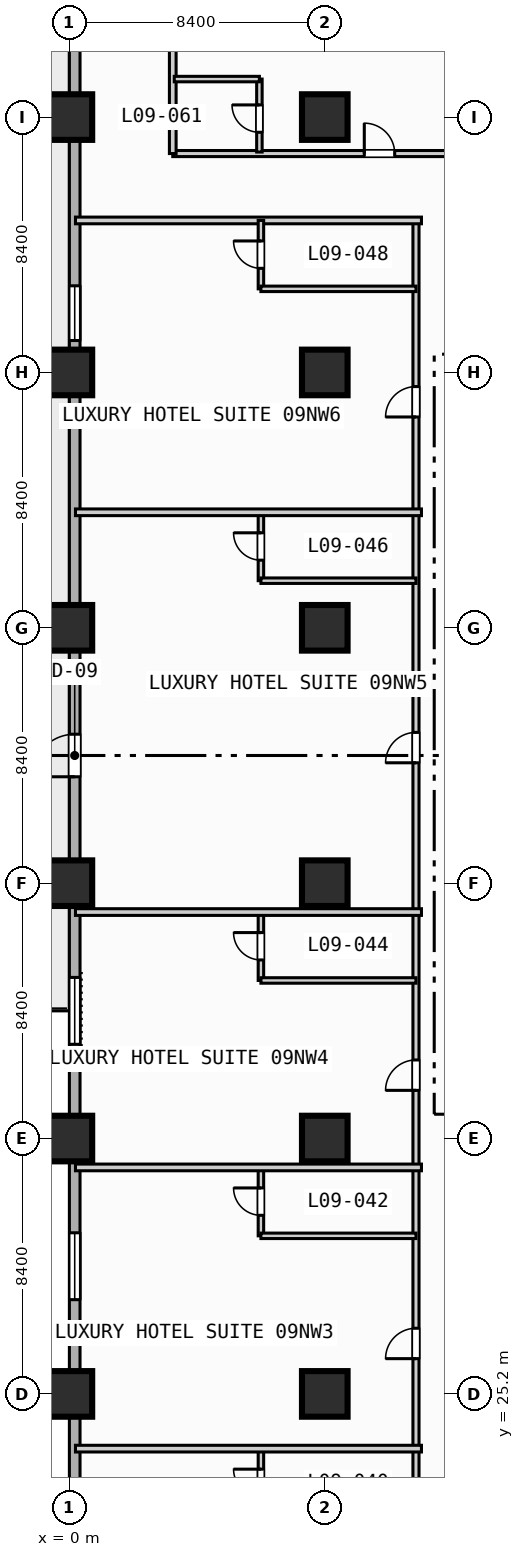
"""IFC4 building model, lengths in metres.
Left out: names, types, materials, properties, quantities, classifications, styles, units other than length and angle.
Written with IfcOpenShell. Run it as: python <this file> out.ifc"""

import sys

from ifc_helpers import new_model, si_unit, direction, frame, frame_2d, origin, origin_2d, place, context, subcontext, project, spatial, rectangle, extrude, element, fill, save


model = new_model("IFC4")
c1 = context("Model", 3, precision=1e-05, world=origin(), true_north=direction((0.0, 1.0)))
c2 = subcontext(c1, "Body", "Model", "MODEL_VIEW")
j1 = project(units=[si_unit("LENGTHUNIT", "METRE"), si_unit("PLANEANGLEUNIT", "RADIAN")], contexts=[c1])
p1 = place(None, origin())
s1 = spatial("IfcSite", under=j1, at=p1, CompositionType="ELEMENT")
p2 = place(p1, origin())
s2 = spatial("IfcBuilding", under=s1, at=p2, CompositionType="ELEMENT")
p3 = place(p2, frame((0.0, 0.0, 43.4)))
s3 = spatial("IfcBuildingStorey", under=s2, at=p3, CompositionType="ELEMENT", Elevation=43.4)
for number, where, z_axis, x_axis in (
    (1, (0.0, 25.2, 0.0), (0.0, 0.0, 1.0), (1.0, 0.0, 0.0)),
    (2, (0.0, 33.6, 0.0), (0.0, 0.0, 1.0), (1.0, 0.0, 0.0)),
    (3, (0.0, 42.0, 0.0), (0.0, 0.0, 1.0), (1.0, 0.0, 0.0)),
    (4, (0.0, 50.4, 0.0), (0.0, 0.0, 1.0), (1.0, 0.0, 0.0)),
    (5, (0.0, 58.8, 0.0), (0.0, 0.0, 1.0), (1.0, 0.0, 0.0)),
    (6, (0.0, 67.2, 0.0), (0.0, 0.0, 1.0), (1.0, 0.0, 0.0)),
    (7, (8.4, 25.2, 0.0), (0.0, 0.0, 1.0), (1.0, 0.0, 0.0)),
    (8, (8.4, 33.6, 0.0), (0.0, 0.0, 1.0), (1.0, 0.0, 0.0)),
    (9, (8.4, 42.0, 0.0), (0.0, 0.0, 1.0), (1.0, 0.0, 0.0)),
    (10, (8.4, 50.4, 0.0), (0.0, 0.0, 1.0), (1.0, 0.0, 0.0)),
    (11, (8.4, 58.8, 0.0), (0.0, 0.0, 1.0), (1.0, 0.0, 0.0)),
    (12, (8.4, 67.2, 0.0), (0.0, 0.0, 1.0), (1.0, 0.0, 0.0)),
):
    element("IfcColumn", number, at=place(p3, frame(where, z_axis=z_axis, x_axis=x_axis)), inside=s3, PredefinedType="COLUMN", context=c2, shape_type="SweptSolid", body=[
        extrude(rectangle(XDim=1.5, YDim=1.5, at=origin_2d()), origin(), (0.0, 0.0, 1.0), 3.8),
    ])
p4 = place(p3, frame((0.175, 3.175, 0.0), z_axis=(0.0, 0.0, 1.0), x_axis=(0.0, 1.0, 0.0)))
e13 = element("IfcWall", 13, at=p4, inside=s3, PredefinedType="STANDARD", context=c2, shape_type="SweptSolid", body=[
    extrude(rectangle(XDim=86.05, YDim=0.35, at=frame_2d((43.025, 0.0))), origin(), (0.0, 0.0, 1.0), 3.55),
])
p5 = place(p4, frame((42.325, 0.0, 0.0)))
e14 = element("IfcOpeningElement", 14, at=p5, cuts=e13, PredefinedType="OPENING", context=c2, shape_type="SweptSolid", body=[
    extrude(rectangle(XDim=1.4, YDim=2.2, at=frame_2d((0.7, 1.1))), frame((0.0, 0.185, 0.0), z_axis=(0.0, -1.0, 0.0), x_axis=(1.0, 0.0, 0.0)), (0.0, 0.0, 1.0), 0.37),
])
p6 = place(p4, frame((8.325, 0.0, 0.85)))
e15 = element("IfcOpeningElement", 15, at=p6, cuts=e13, PredefinedType="OPENING", context=c2, shape_type="SweptSolid", body=[
    extrude(rectangle(XDim=2.2, YDim=1.8, at=frame_2d((1.1, 0.9))), frame((0.0, 0.185, 0.0), z_axis=(0.0, -1.0, 0.0), x_axis=(1.0, 0.0, 0.0)), (0.0, 0.0, 1.0), 0.37),
])
p7 = place(p4, frame((16.725, 0.0, 0.85)))
e16 = element("IfcOpeningElement", 16, at=p7, cuts=e13, PredefinedType="OPENING", context=c2, shape_type="SweptSolid", body=[
    extrude(rectangle(XDim=2.2, YDim=1.8, at=frame_2d((1.1, 0.9))), frame((0.0, 0.185, 0.0), z_axis=(0.0, -1.0, 0.0), x_axis=(1.0, 0.0, 0.0)), (0.0, 0.0, 1.0), 0.37),
])
p8 = place(p4, frame((25.125, 0.0, 0.85)))
e17 = element("IfcOpeningElement", 17, at=p8, cuts=e13, PredefinedType="OPENING", context=c2, shape_type="SweptSolid", body=[
    extrude(rectangle(XDim=2.2, YDim=1.8, at=frame_2d((1.1, 0.9))), frame((0.0, 0.185, 0.0), z_axis=(0.0, -1.0, 0.0), x_axis=(1.0, 0.0, 0.0)), (0.0, 0.0, 1.0), 0.37),
])
p9 = place(p4, frame((33.525, 0.0, 0.85)))
e18 = element("IfcOpeningElement", 18, at=p9, cuts=e13, PredefinedType="OPENING", context=c2, shape_type="SweptSolid", body=[
    extrude(rectangle(XDim=2.2, YDim=1.8, at=frame_2d((1.1, 0.9))), frame((0.0, 0.185, 0.0), z_axis=(0.0, -1.0, 0.0), x_axis=(1.0, 0.0, 0.0)), (0.0, 0.0, 1.0), 0.37),
])
p10 = place(p4, frame((56.675, 0.0, 0.85)))
e19 = element("IfcOpeningElement", 19, at=p10, cuts=e13, PredefinedType="OPENING", context=c2, shape_type="SweptSolid", body=[
    extrude(rectangle(XDim=1.8, YDim=1.8, at=frame_2d((0.9, 0.9))), frame((0.0, 0.185, 0.0), z_axis=(0.0, -1.0, 0.0), x_axis=(1.0, 0.0, 0.0)), (0.0, 0.0, 1.0), 0.37),
])
p11 = place(p3, frame((11.4, 3.4, 0.0), z_axis=(0.0, 0.0, 1.0), x_axis=(0.0, 1.0, 0.0)))
e20 = element("IfcWall", 20, at=p11, inside=s3, PredefinedType="PARTITIONING", context=c2, shape_type="SweptSolid", body=[
    extrude(rectangle(XDim=60.4, YDim=0.2, at=frame_2d((30.2, 0.0))), origin(), (0.0, 0.0, 1.0), 3.55),
])
p12 = place(p11, frame((6.065, 0.0, 0.0)))
e21 = element("IfcOpeningElement", 21, at=p12, cuts=e20, PredefinedType="OPENING", context=c2, shape_type="SweptSolid", body=[
    extrude(rectangle(XDim=1.0, YDim=2.15, at=frame_2d((0.5, 1.075))), frame((0.0, 0.11, 0.0), z_axis=(0.0, -1.0, 0.0), x_axis=(1.0, 0.0, 0.0)), (0.0, 0.0, 1.0), 0.22),
])
p13 = place(p11, frame((13.735, 0.0, 0.0)))
e22 = element("IfcOpeningElement", 22, at=p13, cuts=e20, PredefinedType="OPENING", context=c2, shape_type="SweptSolid", body=[
    extrude(rectangle(XDim=1.0, YDim=2.15, at=frame_2d((0.5, 1.075))), frame((0.0, 0.11, 0.0), z_axis=(0.0, -1.0, 0.0), x_axis=(1.0, 0.0, 0.0)), (0.0, 0.0, 1.0), 0.22),
])
p14 = place(p11, frame((22.96, 0.0, 0.0)))
e23 = element("IfcOpeningElement", 23, at=p14, cuts=e20, PredefinedType="OPENING", context=c2, shape_type="SweptSolid", body=[
    extrude(rectangle(XDim=1.0, YDim=2.15, at=frame_2d((0.5, 1.075))), frame((0.0, 0.11, 0.0), z_axis=(0.0, -1.0, 0.0), x_axis=(1.0, 0.0, 0.0)), (0.0, 0.0, 1.0), 0.22),
])
p15 = place(p11, frame((31.785, 0.0, 0.0)))
e24 = element("IfcOpeningElement", 24, at=p15, cuts=e20, PredefinedType="OPENING", context=c2, shape_type="SweptSolid", body=[
    extrude(rectangle(XDim=1.0, YDim=2.15, at=frame_2d((0.5, 1.075))), frame((0.0, 0.11, 0.0), z_axis=(0.0, -1.0, 0.0), x_axis=(1.0, 0.0, 0.0)), (0.0, 0.0, 1.0), 0.22),
])
p16 = place(p11, frame((42.56, 0.0, 0.0)))
e25 = element("IfcOpeningElement", 25, at=p16, cuts=e20, PredefinedType="OPENING", context=c2, shape_type="SweptSolid", body=[
    extrude(rectangle(XDim=1.0, YDim=2.15, at=frame_2d((0.5, 1.075))), frame((0.0, 0.11, 0.0), z_axis=(0.0, -1.0, 0.0), x_axis=(1.0, 0.0, 0.0)), (0.0, 0.0, 1.0), 0.22),
])
p17 = place(p11, frame((53.935, 0.0, 0.0)))
e26 = element("IfcOpeningElement", 26, at=p17, cuts=e20, PredefinedType="OPENING", context=c2, shape_type="SweptSolid", body=[
    extrude(rectangle(XDim=1.0, YDim=2.15, at=frame_2d((0.5, 1.075))), frame((0.0, 0.11, 0.0), z_axis=(0.0, -1.0, 0.0), x_axis=(1.0, 0.0, 0.0)), (0.0, 0.0, 1.0), 0.22),
])
p18 = place(p3, frame((6.3, 21.15, 0.0), z_axis=(0.0, 0.0, 1.0), x_axis=(0.0, 1.0, 0.0)))
e27 = element("IfcWall", 27, at=p18, inside=s3, PredefinedType="PLUMBINGWALL", context=c2, shape_type="SweptSolid", body=[
    extrude(rectangle(XDim=2.25, YDim=0.18, at=frame_2d((1.125, 0.0))), origin(), (0.0, 0.0, 1.0), 3.55),
])
p19 = place(p18, frame((0.675, 0.0, 0.0)))
e28 = element("IfcOpeningElement", 28, at=p19, cuts=e27, PredefinedType="OPENING", context=c2, shape_type="SweptSolid", body=[
    extrude(rectangle(XDim=0.9, YDim=2.1, at=frame_2d((0.45, 1.05))), frame((0.0, 0.1, 0.0), z_axis=(0.0, -1.0, 0.0), x_axis=(1.0, 0.0, 0.0)), (0.0, 0.0, 1.0), 0.2),
])
p20 = place(p3, frame((0.2, 23.4, 0.0), z_axis=(0.0, 0.0, 1.0), x_axis=(1.0, 0.0, 0.0)))
e29 = element("IfcWall", 29, at=p20, inside=s3, PredefinedType="PARTITIONING", context=c2, shape_type="SweptSolid", body=[
    extrude(rectangle(XDim=11.38, YDim=0.22, at=frame_2d((5.69, 0.0))), origin(), (0.0, 0.0, 1.0), 3.55),
])
p21 = place(p3, frame((6.3, 30.4, 0.0), z_axis=(0.0, 0.0, 1.0), x_axis=(0.0, 1.0, 0.0)))
e30 = element("IfcWall", 30, at=p21, inside=s3, PredefinedType="PLUMBINGWALL", context=c2, shape_type="SweptSolid", body=[
    extrude(rectangle(XDim=2.25, YDim=0.18, at=frame_2d((1.125, 0.0))), origin(), (0.0, 0.0, 1.0), 3.55),
])
p22 = place(p21, frame((0.675, 0.0, 0.0)))
e31 = element("IfcOpeningElement", 31, at=p22, cuts=e30, PredefinedType="OPENING", context=c2, shape_type="SweptSolid", body=[
    extrude(rectangle(XDim=0.9, YDim=2.1, at=frame_2d((0.45, 1.05))), frame((0.0, 0.1, 0.0), z_axis=(0.0, -1.0, 0.0), x_axis=(1.0, 0.0, 0.0)), (0.0, 0.0, 1.0), 0.2),
])
p23 = place(p3, frame((6.3, 30.4, 0.0), z_axis=(0.0, 0.0, 1.0), x_axis=(1.0, 0.0, 0.0)))
e32 = element("IfcWall", 32, at=p23, inside=s3, PredefinedType="PLUMBINGWALL", context=c2, shape_type="SweptSolid", body=[
    extrude(rectangle(XDim=5.1, YDim=0.18, at=frame_2d((2.55, 0.0))), origin(), (0.0, 0.0, 1.0), 3.55),
])
p24 = place(p3, frame((0.2, 32.65, 0.0), z_axis=(0.0, 0.0, 1.0), x_axis=(1.0, 0.0, 0.0)))
e33 = element("IfcWall", 33, at=p24, inside=s3, PredefinedType="PARTITIONING", context=c2, shape_type="SweptSolid", body=[
    extrude(rectangle(XDim=11.38, YDim=0.22, at=frame_2d((5.69, 0.0))), origin(), (0.0, 0.0, 1.0), 3.55),
])
p25 = place(p3, frame((6.3, 38.8, 0.0), z_axis=(0.0, 0.0, 1.0), x_axis=(0.0, 1.0, 0.0)))
e34 = element("IfcWall", 34, at=p25, inside=s3, PredefinedType="PLUMBINGWALL", context=c2, shape_type="SweptSolid", body=[
    extrude(rectangle(XDim=2.25, YDim=0.18, at=frame_2d((1.125, 0.0))), origin(), (0.0, 0.0, 1.0), 3.55),
])
p26 = place(p25, frame((0.675, 0.0, 0.0)))
e35 = element("IfcOpeningElement", 35, at=p26, cuts=e34, PredefinedType="OPENING", context=c2, shape_type="SweptSolid", body=[
    extrude(rectangle(XDim=0.9, YDim=2.1, at=frame_2d((0.45, 1.05))), frame((0.0, 0.1, 0.0), z_axis=(0.0, -1.0, 0.0), x_axis=(1.0, 0.0, 0.0)), (0.0, 0.0, 1.0), 0.2),
])
p27 = place(p3, frame((6.3, 38.8, 0.0), z_axis=(0.0, 0.0, 1.0), x_axis=(1.0, 0.0, 0.0)))
e36 = element("IfcWall", 36, at=p27, inside=s3, PredefinedType="PLUMBINGWALL", context=c2, shape_type="SweptSolid", body=[
    extrude(rectangle(XDim=5.1, YDim=0.18, at=frame_2d((2.55, 0.0))), origin(), (0.0, 0.0, 1.0), 3.55),
])
p28 = place(p3, frame((0.2, 41.05, 0.0), z_axis=(0.0, 0.0, 1.0), x_axis=(1.0, 0.0, 0.0)))
e37 = element("IfcWall", 37, at=p28, inside=s3, PredefinedType="PARTITIONING", context=c2, shape_type="SweptSolid", body=[
    extrude(rectangle(XDim=11.38, YDim=0.22, at=frame_2d((5.69, 0.0))), origin(), (0.0, 0.0, 1.0), 3.55),
])
p29 = place(p3, frame((6.3, 51.95, 0.0), z_axis=(0.0, 0.0, 1.0), x_axis=(0.0, 1.0, 0.0)))
e38 = element("IfcWall", 38, at=p29, inside=s3, PredefinedType="PLUMBINGWALL", context=c2, shape_type="SweptSolid", body=[
    extrude(rectangle(XDim=2.25, YDim=0.18, at=frame_2d((1.125, 0.0))), origin(), (0.0, 0.0, 1.0), 3.55),
])
p30 = place(p29, frame((0.675, 0.0, 0.0)))
e39 = element("IfcOpeningElement", 39, at=p30, cuts=e38, PredefinedType="OPENING", context=c2, shape_type="SweptSolid", body=[
    extrude(rectangle(XDim=0.9, YDim=2.1, at=frame_2d((0.45, 1.05))), frame((0.0, 0.1, 0.0), z_axis=(0.0, -1.0, 0.0), x_axis=(1.0, 0.0, 0.0)), (0.0, 0.0, 1.0), 0.2),
])
p31 = place(p3, frame((6.3, 51.95, 0.0), z_axis=(0.0, 0.0, 1.0), x_axis=(1.0, 0.0, 0.0)))
e40 = element("IfcWall", 40, at=p31, inside=s3, PredefinedType="PLUMBINGWALL", context=c2, shape_type="SweptSolid", body=[
    extrude(rectangle(XDim=5.1, YDim=0.18, at=frame_2d((2.55, 0.0))), origin(), (0.0, 0.0, 1.0), 3.55),
])
for number, where, z_axis, x_axis in (
    (41, (0.2, 54.2, 0.0), (0.0, 0.0, 1.0), (1.0, 0.0, 0.0)),
    (42, (0.2, 63.8, 0.0), (0.0, 0.0, 1.0), (1.0, 0.0, 0.0)),
):
    element("IfcWall", number, at=place(p3, frame(where, z_axis=z_axis, x_axis=x_axis)), inside=s3, PredefinedType="PARTITIONING", context=c2, shape_type="SweptSolid", body=[
        extrude(rectangle(XDim=11.38, YDim=0.22, at=frame_2d((5.69, 0.0))), origin(), (0.0, 0.0, 1.0), 3.55),
    ])
p32 = place(p3, frame((6.3, 61.55, 0.0), z_axis=(0.0, 0.0, 1.0), x_axis=(0.0, 1.0, 0.0)))
e43 = element("IfcWall", 43, at=p32, inside=s3, PredefinedType="PLUMBINGWALL", context=c2, shape_type="SweptSolid", body=[
    extrude(rectangle(XDim=2.25, YDim=0.18, at=frame_2d((1.125, 0.0))), origin(), (0.0, 0.0, 1.0), 3.55),
])
p33 = place(p32, frame((0.675, 0.0, 0.0)))
e44 = element("IfcOpeningElement", 44, at=p33, cuts=e43, PredefinedType="OPENING", context=c2, shape_type="SweptSolid", body=[
    extrude(rectangle(XDim=0.9, YDim=2.1, at=frame_2d((0.45, 1.05))), frame((0.0, 0.1, 0.0), z_axis=(0.0, -1.0, 0.0), x_axis=(1.0, 0.0, 0.0)), (0.0, 0.0, 1.0), 0.2),
])
p34 = place(p3, frame((6.3, 61.55, 0.0), z_axis=(0.0, 0.0, 1.0), x_axis=(1.0, 0.0, 0.0)))
e45 = element("IfcWall", 45, at=p34, inside=s3, PredefinedType="PLUMBINGWALL", context=c2, shape_type="SweptSolid", body=[
    extrude(rectangle(XDim=5.1, YDim=0.18, at=frame_2d((2.55, 0.0))), origin(), (0.0, 0.0, 1.0), 3.55),
])
p35 = place(p3, frame((3.4, 66.0, 0.0), z_axis=(0.0, 0.0, 1.0), x_axis=(1.0, 0.0, 0.0)))
e46 = element("IfcWall", 46, at=p35, inside=s3, PredefinedType="PARTITIONING", context=c2, shape_type="SweptSolid", body=[
    extrude(rectangle(XDim=18.2, YDim=0.2, at=frame_2d((9.1, 0.0))), origin(), (0.0, 0.0, 1.0), 3.55),
])
p36 = place(p35, frame((6.3, 0.0, 0.0)))
e47 = element("IfcOpeningElement", 47, at=p36, cuts=e46, PredefinedType="OPENING", context=c2, shape_type="SweptSolid", body=[
    extrude(rectangle(XDim=1.0, YDim=2.15, at=frame_2d((0.5, 1.075))), frame((0.0, 0.11, 0.0), z_axis=(0.0, -1.0, 0.0), x_axis=(1.0, 0.0, 0.0)), (0.0, 0.0, 1.0), 0.22),
])
p37 = place(p3, frame((3.4, 66.0, 0.0), z_axis=(0.0, 0.0, 1.0), x_axis=(0.0, 1.0, 0.0)))
e48 = element("IfcWall", 48, at=p37, inside=s3, PredefinedType="PARTITIONING", context=c2, shape_type="SweptSolid", body=[
    extrude(rectangle(XDim=23.0, YDim=0.22, at=frame_2d((11.5, 0.0))), origin(), (0.0, 0.0, 1.0), 3.55),
])
p38 = place(p3, frame((6.25, 66.05, 0.0), z_axis=(0.0, 0.0, 1.0), x_axis=(0.0, 1.0, 0.0)))
e49 = element("IfcWall", 49, at=p38, inside=s3, PredefinedType="PLUMBINGWALL", context=c2, shape_type="SweptSolid", body=[
    extrude(rectangle(XDim=2.4, YDim=0.18, at=frame_2d((1.2, 0.0))), origin(), (0.0, 0.0, 1.0), 3.55),
])
p39 = place(p38, frame((0.65, 0.0, 0.0)))
e50 = element("IfcOpeningElement", 50, at=p39, cuts=e49, PredefinedType="OPENING", context=c2, shape_type="SweptSolid", body=[
    extrude(rectangle(XDim=0.9, YDim=2.1, at=frame_2d((0.45, 1.05))), frame((0.0, 0.1, 0.0), z_axis=(0.0, -1.0, 0.0), x_axis=(1.0, 0.0, 0.0)), (0.0, 0.0, 1.0), 0.2),
])
p40 = place(p3, frame((3.45, 68.45, 0.0), z_axis=(0.0, 0.0, 1.0), x_axis=(1.0, 0.0, 0.0)))
e51 = element("IfcWall", 51, at=p40, inside=s3, PredefinedType="PLUMBINGWALL", context=c2, shape_type="SweptSolid", body=[
    extrude(rectangle(XDim=2.8, YDim=0.18, at=frame_2d((1.4, 0.0))), origin(), (0.0, 0.0, 1.0), 3.55),
])
p41 = place(p5, origin())
e52 = element("IfcDoor", 52, at=p41, inside=s3, OperationType="SINGLE_SWING_LEFT", PredefinedType="DOOR", context=c2, shape_type="SweptSolid", body=[
    extrude(rectangle(XDim=1.4, YDim=2.2, at=frame_2d((0.7, 1.1))), frame((0.0, 0.025, 0.0), z_axis=(0.0, -1.0, 0.0), x_axis=(1.0, 0.0, 0.0)), (0.0, 0.0, 1.0), 0.05),
])
fill(e14, e52)
p42 = place(p8, origin())
e53 = element("IfcWindow", 53, at=p42, inside=s3, PartitioningType="SINGLE_PANEL", PredefinedType="WINDOW", context=c2, shape_type="SweptSolid", body=[
    extrude(rectangle(XDim=2.2, YDim=1.8, at=frame_2d((1.1, 0.9))), frame((0.0, 0.03, 0.0), z_axis=(0.0, -1.0, 0.0), x_axis=(1.0, 0.0, 0.0)), (0.0, 0.0, 1.0), 0.06),
])
fill(e17, e53)
p43 = place(p9, origin())
e54 = element("IfcWindow", 54, at=p43, inside=s3, PartitioningType="SINGLE_PANEL", PredefinedType="WINDOW", context=c2, shape_type="SweptSolid", body=[
    extrude(rectangle(XDim=2.2, YDim=1.8, at=frame_2d((1.1, 0.9))), frame((0.0, 0.03, 0.0), z_axis=(0.0, -1.0, 0.0), x_axis=(1.0, 0.0, 0.0)), (0.0, 0.0, 1.0), 0.06),
])
fill(e18, e54)
p44 = place(p10, origin())
e55 = element("IfcWindow", 55, at=p44, inside=s3, PartitioningType="SINGLE_PANEL", PredefinedType="WINDOW", context=c2, shape_type="SweptSolid", body=[
    extrude(rectangle(XDim=1.8, YDim=1.8, at=frame_2d((0.9, 0.9))), frame((0.0, 0.03, 0.0), z_axis=(0.0, -1.0, 0.0), x_axis=(1.0, 0.0, 0.0)), (0.0, 0.0, 1.0), 0.06),
])
fill(e19, e55)
p45 = place(p14, origin())
e56 = element("IfcDoor", 56, at=p45, inside=s3, OperationType="SINGLE_SWING_LEFT", PredefinedType="DOOR", context=c2, shape_type="SweptSolid", body=[
    extrude(rectangle(XDim=1.0, YDim=2.15, at=frame_2d((0.5, 1.075))), frame((0.0, 0.025, 0.0), z_axis=(0.0, -1.0, 0.0), x_axis=(1.0, 0.0, 0.0)), (0.0, 0.0, 1.0), 0.05),
])
fill(e23, e56)
p46 = place(p15, origin())
e57 = element("IfcDoor", 57, at=p46, inside=s3, OperationType="SINGLE_SWING_LEFT", PredefinedType="DOOR", context=c2, shape_type="SweptSolid", body=[
    extrude(rectangle(XDim=1.0, YDim=2.15, at=frame_2d((0.5, 1.075))), frame((0.0, 0.025, 0.0), z_axis=(0.0, -1.0, 0.0), x_axis=(1.0, 0.0, 0.0)), (0.0, 0.0, 1.0), 0.05),
])
fill(e24, e57)
p47 = place(p16, origin())
e58 = element("IfcDoor", 58, at=p47, inside=s3, OperationType="SINGLE_SWING_LEFT", PredefinedType="DOOR", context=c2, shape_type="SweptSolid", body=[
    extrude(rectangle(XDim=1.0, YDim=2.15, at=frame_2d((0.5, 1.075))), frame((0.0, 0.025, 0.0), z_axis=(0.0, -1.0, 0.0), x_axis=(1.0, 0.0, 0.0)), (0.0, 0.0, 1.0), 0.05),
])
fill(e25, e58)
p48 = place(p17, origin())
e59 = element("IfcDoor", 59, at=p48, inside=s3, OperationType="SINGLE_SWING_LEFT", PredefinedType="DOOR", context=c2, shape_type="SweptSolid", body=[
    extrude(rectangle(XDim=1.0, YDim=2.15, at=frame_2d((0.5, 1.075))), frame((0.0, 0.025, 0.0), z_axis=(0.0, -1.0, 0.0), x_axis=(1.0, 0.0, 0.0)), (0.0, 0.0, 1.0), 0.05),
])
fill(e26, e59)
p49 = place(p19, origin())
e60 = element("IfcDoor", 60, at=p49, inside=s3, OperationType="SINGLE_SWING_RIGHT", PredefinedType="DOOR", context=c2, shape_type="SweptSolid", body=[
    extrude(rectangle(XDim=0.9, YDim=2.1, at=frame_2d((0.45, 1.05))), frame((0.0, 0.025, 0.0), z_axis=(0.0, -1.0, 0.0), x_axis=(1.0, 0.0, 0.0)), (0.0, 0.0, 1.0), 0.05),
])
fill(e28, e60)
p50 = place(p22, origin())
e61 = element("IfcDoor", 61, at=p50, inside=s3, OperationType="SINGLE_SWING_RIGHT", PredefinedType="DOOR", context=c2, shape_type="SweptSolid", body=[
    extrude(rectangle(XDim=0.9, YDim=2.1, at=frame_2d((0.45, 1.05))), frame((0.0, 0.025, 0.0), z_axis=(0.0, -1.0, 0.0), x_axis=(1.0, 0.0, 0.0)), (0.0, 0.0, 1.0), 0.05),
])
fill(e31, e61)
p51 = place(p26, origin())
e62 = element("IfcDoor", 62, at=p51, inside=s3, OperationType="SINGLE_SWING_RIGHT", PredefinedType="DOOR", context=c2, shape_type="SweptSolid", body=[
    extrude(rectangle(XDim=0.9, YDim=2.1, at=frame_2d((0.45, 1.05))), frame((0.0, 0.025, 0.0), z_axis=(0.0, -1.0, 0.0), x_axis=(1.0, 0.0, 0.0)), (0.0, 0.0, 1.0), 0.05),
])
fill(e35, e62)
p52 = place(p30, origin())
e63 = element("IfcDoor", 63, at=p52, inside=s3, OperationType="SINGLE_SWING_RIGHT", PredefinedType="DOOR", context=c2, shape_type="SweptSolid", body=[
    extrude(rectangle(XDim=0.9, YDim=2.1, at=frame_2d((0.45, 1.05))), frame((0.0, 0.025, 0.0), z_axis=(0.0, -1.0, 0.0), x_axis=(1.0, 0.0, 0.0)), (0.0, 0.0, 1.0), 0.05),
])
fill(e39, e63)
p53 = place(p33, origin())
e64 = element("IfcDoor", 64, at=p53, inside=s3, OperationType="SINGLE_SWING_RIGHT", PredefinedType="DOOR", context=c2, shape_type="SweptSolid", body=[
    extrude(rectangle(XDim=0.9, YDim=2.1, at=frame_2d((0.45, 1.05))), frame((0.0, 0.025, 0.0), z_axis=(0.0, -1.0, 0.0), x_axis=(1.0, 0.0, 0.0)), (0.0, 0.0, 1.0), 0.05),
])
fill(e44, e64)
p54 = place(p36, origin())
e65 = element("IfcDoor", 65, at=p54, inside=s3, OperationType="SINGLE_SWING_LEFT", PredefinedType="DOOR", context=c2, shape_type="SweptSolid", body=[
    extrude(rectangle(XDim=1.0, YDim=2.15, at=frame_2d((0.5, 1.075))), frame((0.0, 0.025, 0.0), z_axis=(0.0, -1.0, 0.0), x_axis=(1.0, 0.0, 0.0)), (0.0, 0.0, 1.0), 0.05),
])
fill(e47, e65)
p55 = place(p39, origin())
e66 = element("IfcDoor", 66, at=p55, inside=s3, OperationType="SINGLE_SWING_RIGHT", PredefinedType="DOOR", context=c2, shape_type="SweptSolid", body=[
    extrude(rectangle(XDim=0.9, YDim=2.1, at=frame_2d((0.45, 1.05))), frame((0.0, 0.025, 0.0), z_axis=(0.0, -1.0, 0.0), x_axis=(1.0, 0.0, 0.0)), (0.0, 0.0, 1.0), 0.05),
])
fill(e50, e66)
save(model, sys.argv[1])
